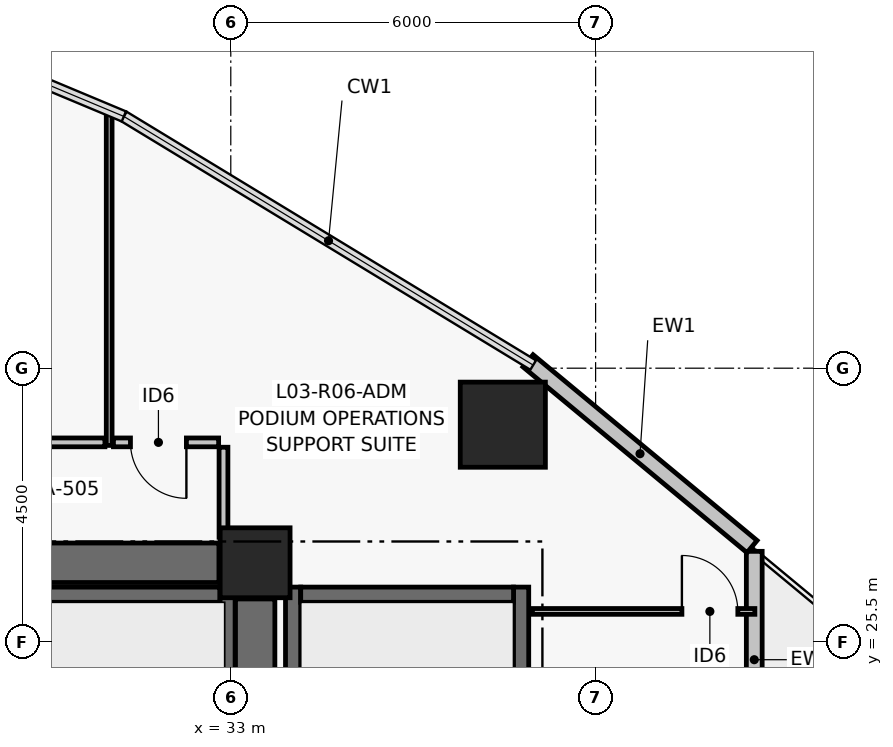
"""IFC4 building model, lengths in metres.
Left out: names, types, materials, properties, quantities, classifications, styles, units other than length and angle.
Written with IfcOpenShell. Run it as: python <this file> out.ifc"""

import sys

from ifc_helpers import new_model, si_unit, direction, frame, frame_2d, origin, origin_2d, place, context, subcontext, project, spatial, rectangle, hollow_rectangle, extrude, element, fill, save


model = new_model("IFC4")
c1 = context("Model", 3, precision=1e-05, world=origin(), true_north=direction((0.0, 1.0)))
c2 = subcontext(c1, "Body", "Model", "MODEL_VIEW")
j1 = project(units=[si_unit("LENGTHUNIT", "METRE"), si_unit("PLANEANGLEUNIT", "RADIAN")], contexts=[c1])
p1 = place(None, origin())
s1 = spatial("IfcSite", under=j1, at=p1, CompositionType="ELEMENT")
p2 = place(p1, origin())
s2 = spatial("IfcBuilding", under=s1, at=p2, CompositionType="ELEMENT")
p3 = place(p2, frame((0.0, 0.0, 18.0)))
s3 = spatial("IfcBuildingStorey", under=s2, at=p3, CompositionType="ELEMENT", Elevation=18.0)
p4 = place(p3, frame((33.4, 26.8, 0.0), z_axis=(0.0, 0.0, 1.0), x_axis=(1.0, 0.0, 0.0)))
e1 = element("IfcColumn", 1, at=p4, inside=s3, PredefinedType="COLUMN", context=c2, shape_type="SweptSolid", body=[
    extrude(rectangle(XDim=1.15, YDim=1.15, at=origin_2d()), origin(), (0.0, 0.0, 1.0), 4.8),
])
p5 = place(p3, frame((29.745, 26.8, 0.0), z_axis=(0.0, 0.0, 1.0), x_axis=(1.0, 0.0, 0.0)))
e2 = element("IfcWall", 2, at=p5, inside=s3, PredefinedType="SHEAR", context=c2, shape_type="SweptSolid", body=[
    extrude(rectangle(XDim=3.06, YDim=0.65, at=frame_2d((1.53, 0.0))), origin(), (0.0, 0.0, 1.0), 4.48),
])
p6 = place(p3, frame((33.4, 17.795, 0.0), z_axis=(0.0, 0.0, 1.0), x_axis=(0.0, 1.0, 0.0)))
e3 = element("IfcWall", 3, at=p6, inside=s3, PredefinedType="SHEAR", context=c2, shape_type="SweptSolid", body=[
    extrude(rectangle(XDim=8.41, YDim=0.65, at=frame_2d((4.205, 0.0))), origin(), (0.0, 0.0, 1.0), 4.48),
])
p7 = place(p3, frame((32.946, 17.6, 0.0), z_axis=(0.0, 0.0, 1.0), x_axis=(0.0, 1.0, 0.0)))
e4 = element("IfcWall", 4, at=p7, inside=s3, PredefinedType="SHEAR", context=c2, shape_type="SweptSolid", body=[
    extrude(rectangle(XDim=8.8, YDim=0.25, at=frame_2d((4.4, 0.0))), origin(), (0.0, 0.0, 1.0), 4.48),
])
p8 = place(p3, frame((29.4, 26.275, 0.0), z_axis=(0.0, 0.0, 1.0), x_axis=(1.0, 0.0, 0.0)))
e5 = element("IfcWall", 5, at=p8, inside=s3, PredefinedType="SHEAR", context=c2, shape_type="SweptSolid", body=[
    extrude(rectangle(XDim=3.421, YDim=0.25, at=frame_2d((1.71, 0.0))), origin(), (0.0, 0.0, 1.0), 4.48),
])
for number, where, z_axis, x_axis in (
    (6, (34.025, 17.6, 0.0), (0.0, 0.0, 1.0), (0.0, 1.0, 0.0)),
    (7, (37.775, 17.6, 0.0), (0.0, 0.0, 1.0), (0.0, 1.0, 0.0)),
):
    element("IfcWall", number, at=place(p3, frame(where, z_axis=z_axis, x_axis=x_axis)), inside=s3, PredefinedType="SHEAR", context=c2, shape_type="SweptSolid", body=[
        extrude(rectangle(XDim=8.8, YDim=0.25, at=frame_2d((4.4, 0.0))), origin(), (0.0, 0.0, 1.0), 4.48),
    ])
p9 = place(p3, frame((34.15, 26.275, 0.0), z_axis=(0.0, 0.0, 1.0), x_axis=(1.0, 0.0, 0.0)))
e8 = element("IfcWall", 8, at=p9, inside=s3, PredefinedType="SHEAR", context=c2, shape_type="SweptSolid", body=[
    extrude(rectangle(XDim=3.5, YDim=0.25, at=frame_2d((1.75, 0.0))), origin(), (0.0, 0.0, 1.0), 4.48),
])
p10 = place(p3, frame((37.474, 29.071, 0.0), z_axis=(0.0, 0.0, 1.0), x_axis=(1.0, 0.0, 0.0)))
e9 = element("IfcColumn", 9, at=p10, inside=s3, PredefinedType="COLUMN", context=c2, shape_type="SweptSolid", body=[
    extrude(hollow_rectangle(XDim=1.4, YDim=1.4, WallThickness=0.055, at=origin_2d()), origin(), (0.0, 0.0, 1.0), 4.8),
])
p11 = place(p3, frame((41.609, 26.988, 0.0), z_axis=(0.0, 0.0, 1.0), x_axis=(0.0, -1.0, 0.0)))
e10 = element("IfcWall", 10, at=p11, inside=s3, PredefinedType="PARTITIONING", context=c2, shape_type="SweptSolid", body=[
    extrude(rectangle(XDim=3.564, YDim=0.26, at=frame_2d((1.782, 0.0))), origin(), (0.0, 0.0, 1.0), 3.86),
])
p12 = place(p3, frame((37.888, 30.121, 0.0), z_axis=(0.0, 0.0, 1.0), x_axis=(0.769749401626, -0.638346190321, 0.0)))
e11 = element("IfcWall", 11, at=p12, inside=s3, PredefinedType="PARTITIONING", context=c2, shape_type="SweptSolid", body=[
    extrude(rectangle(XDim=4.786, YDim=0.26, at=frame_2d((2.393, 0.0))), origin(), (0.0, 0.0, 1.0), 4.48),
])
p13 = place(p3, frame((33.74, 27.22, 0.0), z_axis=(0.0, 0.0, 1.0), x_axis=(-1.0, 0.0, 0.0)))
e12 = element("IfcWall", 12, at=p13, inside=s3, PredefinedType="PARTITIONING", context=c2, shape_type="SweptSolid", body=[
    extrude(rectangle(XDim=0.86, YDim=0.145, at=frame_2d((0.43, 0.0))), origin(), (0.0, 0.0, 1.0), 3.56),
])
p14 = place(p3, frame((32.88, 27.22, 0.0), z_axis=(0.0, 0.0, 1.0), x_axis=(0.0, 1.0, 0.0)))
e13 = element("IfcWall", 13, at=p14, inside=s3, PredefinedType="PARTITIONING", context=c2, shape_type="SweptSolid", body=[
    extrude(rectangle(XDim=1.48, YDim=0.145, at=frame_2d((0.74, 0.0))), origin(), (0.0, 0.0, 1.0), 3.61),
])
p15 = place(p3, frame((32.8, 28.78, 0.0), z_axis=(0.0, 0.0, 1.0), x_axis=(-1.0, 0.0, 0.0)))
e14 = element("IfcWall", 14, at=p15, inside=s3, PredefinedType="PARTITIONING", context=c2, shape_type="SweptSolid", body=[
    extrude(rectangle(XDim=1.73, YDim=0.145, at=frame_2d((0.865, 0.0))), origin(), (0.0, 0.0, 1.0), 4.01),
])
p16 = place(p15, frame((0.53, 0.0, 0.0)))
e15 = element("IfcOpeningElement", 15, at=p16, cuts=e14, PredefinedType="OPENING", context=c2, shape_type="SweptSolid", body=[
    extrude(rectangle(XDim=0.92, YDim=2.05, at=frame_2d((0.46, 1.025))), frame((0.0, 0.083, 0.0), z_axis=(0.0, -1.0, 0.0), x_axis=(1.0, 0.0, 0.0)), (0.0, 0.0, 1.0), 0.165),
])
p17 = place(p3, frame((30.93, 28.78, 0.0), z_axis=(0.0, 0.0, 1.0), x_axis=(-1.0, 0.0, 0.0)))
e16 = element("IfcWall", 16, at=p17, inside=s3, PredefinedType="PARTITIONING", context=c2, shape_type="SweptSolid", body=[
    extrude(rectangle(XDim=11.36, YDim=0.145, at=frame_2d((5.68, 0.0))), origin(), (0.0, 0.0, 1.0), 3.56),
])
p18 = place(p17, frame((5.205, 0.0, 0.0)))
e17 = element("IfcOpeningElement", 17, at=p18, cuts=e16, PredefinedType="OPENING", context=c2, shape_type="SweptSolid", body=[
    extrude(rectangle(XDim=0.95, YDim=2.06, at=frame_2d((0.475, 1.03))), frame((0.0, 0.083, 0.0), z_axis=(0.0, -1.0, 0.0), x_axis=(1.0, 0.0, 0.0)), (0.0, 0.0, 1.0), 0.165),
])
p19 = place(p3, frame((31.0, 28.73, 0.0), z_axis=(0.0, 0.0, 1.0), x_axis=(0.0, 1.0, 0.0)))
e18 = element("IfcWall", 18, at=p19, inside=s3, PredefinedType="PARTITIONING", context=c2, shape_type="SweptSolid", body=[
    extrude(rectangle(XDim=5.522, YDim=0.095, at=frame_2d((2.761, 0.0))), origin(), (0.0, 0.0, 1.0), 3.86),
])
p20 = place(p3, frame((37.96, 26.0, 0.0), z_axis=(0.0, 0.0, 1.0), x_axis=(1.0, 0.0, 0.0)))
e19 = element("IfcWall", 19, at=p20, inside=s3, PredefinedType="PARTITIONING", context=c2, shape_type="SweptSolid", body=[
    extrude(rectangle(XDim=3.659, YDim=0.095, at=frame_2d((1.83, 0.0))), origin(), (0.0, 0.0, 1.0), 3.86),
])
p21 = place(p20, frame((2.459, 0.0, 0.0)))
e20 = element("IfcOpeningElement", 20, at=p21, cuts=e19, PredefinedType="OPENING", context=c2, shape_type="SweptSolid", body=[
    extrude(rectangle(XDim=0.92, YDim=2.05, at=frame_2d((0.46, 1.025))), frame((0.0, 0.057, 0.0), z_axis=(0.0, -1.0, 0.0), x_axis=(1.0, 0.0, 0.0)), (0.0, 0.0, 1.0), 0.115),
])
p22 = place(p16, origin())
e21 = element("IfcDoor", 21, at=p22, inside=s3, OperationType="SINGLE_SWING_LEFT", PredefinedType="DOOR", context=c2, shape_type="SweptSolid", body=[
    extrude(rectangle(XDim=0.92, YDim=2.05, at=frame_2d((0.46, 1.025))), frame((0.0, 0.025, 0.0), z_axis=(0.0, -1.0, 0.0), x_axis=(1.0, 0.0, 0.0)), (0.0, 0.0, 1.0), 0.05),
])
fill(e15, e21)
p23 = place(p21, origin())
e22 = element("IfcDoor", 22, at=p23, inside=s3, OperationType="SINGLE_SWING_LEFT", PredefinedType="DOOR", context=c2, shape_type="SweptSolid", body=[
    extrude(rectangle(XDim=0.92, YDim=2.05, at=frame_2d((0.46, 1.025))), frame((0.0, 0.025, 0.0), z_axis=(0.0, -1.0, 0.0), x_axis=(1.0, 0.0, 0.0)), (0.0, 0.0, 1.0), 0.05),
])
fill(e20, e22)
save(model, sys.argv[1])
